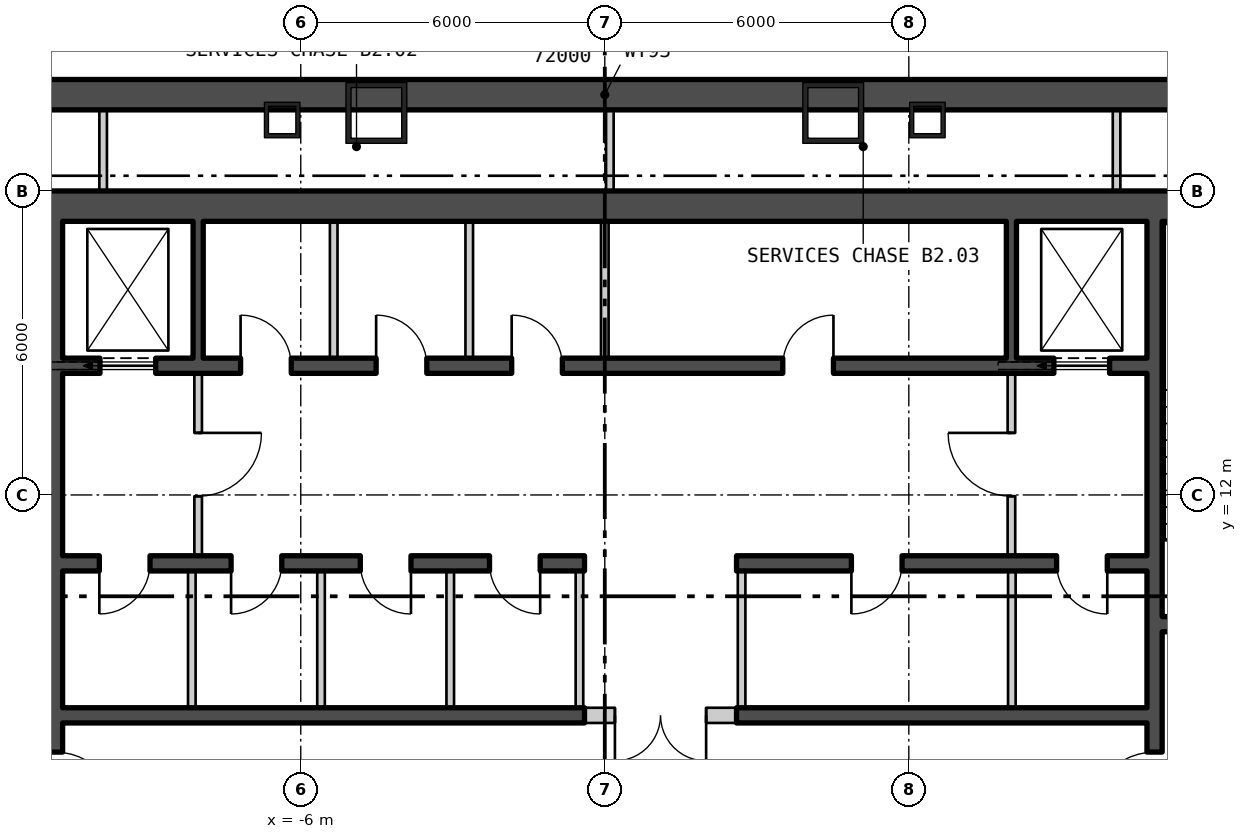
"""IFC4 building model, lengths in metres.
Left out: names, types, materials, properties, quantities, classifications, styles, units other than length and angle.
Written with IfcOpenShell. Run it as: python <this file> out.ifc"""

import sys

from ifc_helpers import new_model, si_unit, direction, frame, frame_2d, origin, origin_2d, place, context, subcontext, project, spatial, rectangle, hollow_rectangle, extrude, element, fill, save


model = new_model("IFC4")
c1 = context("Model", 3, precision=1e-05, world=origin(), true_north=direction((0.0, 1.0)))
c2 = subcontext(c1, "Body", "Model", "MODEL_VIEW")
j1 = project(units=[si_unit("LENGTHUNIT", "METRE"), si_unit("PLANEANGLEUNIT", "RADIAN")], contexts=[c1])
p1 = place(None, origin())
s1 = spatial("IfcSite", under=j1, at=p1, CompositionType="ELEMENT")
p2 = place(p1, origin())
s2 = spatial("IfcBuilding", under=s1, at=p2, CompositionType="ELEMENT")
p3 = place(p2, frame((0.0, 0.0, -11.4)))
s3 = spatial("IfcBuildingStorey", under=s2, at=p3, CompositionType="ELEMENT", Elevation=-11.4)
for number, where, z_axis, x_axis in (
    (1, (4.508, 19.54, 0.0), (0.0, 0.0, 1.0), (-1.0, 0.0, 0.0)),
    (2, (-4.508, 19.54, 0.0), (0.0, 0.0, 1.0), (-1.0, 0.0, 0.0)),
):
    element("IfcColumn", number, at=place(p3, frame(where, z_axis=z_axis, x_axis=x_axis)), inside=s3, PredefinedType="COLUMN", context=c2, shape_type="SweptSolid", body=[
        extrude(hollow_rectangle(XDim=1.2, YDim=1.2, WallThickness=0.1, at=origin_2d()), origin(), (0.0, 0.0, 1.0), 5.7),
    ])
for number, where, z_axis, x_axis in (
    (3, (6.367, 19.4, 0.0), (0.0, 0.0, 1.0), (-1.0, 0.0, 0.0)),
    (4, (-6.367, 19.4, 0.0), (0.0, 0.0, 1.0), (-1.0, 0.0, 0.0)),
):
    element("IfcColumn", number, at=place(p3, frame(where, z_axis=z_axis, x_axis=x_axis)), inside=s3, PredefinedType="COLUMN", context=c2, shape_type="SweptSolid", body=[
        extrude(hollow_rectangle(XDim=0.7, YDim=0.7, WallThickness=0.08, at=origin_2d()), origin(), (0.0, 0.0, 1.0), 5.7),
    ])
p4 = place(p3, frame((-39.0, 19.9, -0.4), z_axis=(0.0, 0.0, 1.0), x_axis=(1.0, 0.0, 0.0)))
e5 = element("IfcWall", 5, at=p4, inside=s3, PredefinedType="STANDARD", context=c2, shape_type="SweptSolid", body=[
    extrude(rectangle(XDim=78.0, YDim=0.6, at=frame_2d((39.0, 0.0))), origin(), (0.0, 0.0, 1.0), 5.7),
])
p5 = place(p3, frame((-17.5, 17.7, 0.0), z_axis=(0.0, 0.0, 1.0), x_axis=(1.0, 0.0, 0.0)))
e6 = element("IfcWall", 6, at=p5, inside=s3, PredefinedType="SHEAR", context=c2, shape_type="SweptSolid", body=[
    extrude(rectangle(XDim=35.0, YDim=0.6, at=frame_2d((17.5, 0.0))), origin(), (0.0, 0.0, 1.0), 5.25),
])
p6 = place(p3, frame((-10.85, 0.6, 0.0), z_axis=(0.0, 0.0, 1.0), x_axis=(0.0, 1.0, 0.0)))
e7 = element("IfcWall", 7, at=p6, inside=s3, PredefinedType="SHEAR", context=c2, shape_type="SweptSolid", body=[
    extrude(rectangle(XDim=16.8, YDim=0.3, at=frame_2d((8.4, 0.0))), origin(), (0.0, 0.0, 1.0), 5.25),
])
p7 = place(p6, frame((5.075, 0.0, 0.0)))
e8 = element("IfcOpeningElement", 8, at=p7, cuts=e7, PredefinedType="OPENING", context=c2, shape_type="SweptSolid", body=[
    extrude(rectangle(XDim=1.25, YDim=2.1, at=frame_2d((0.625, 1.05))), frame((0.0, 0.16, 0.0), z_axis=(0.0, -1.0, 0.0), x_axis=(1.0, 0.0, 0.0)), (0.0, 0.0, 1.0), 0.32),
])
p8 = place(p6, frame((1.525, 0.0, 0.0)))
e9 = element("IfcOpeningElement", 9, at=p8, cuts=e7, PredefinedType="OPENING", context=c2, shape_type="SweptSolid", body=[
    extrude(rectangle(XDim=1.0, YDim=2.1, at=frame_2d((0.5, 1.05))), frame((0.0, 0.16, 0.0), z_axis=(0.0, -1.0, 0.0), x_axis=(1.0, 0.0, 0.0)), (0.0, 0.0, 1.0), 0.32),
])
p9 = place(p3, frame((10.85, 0.6, 0.0), z_axis=(0.0, 0.0, 1.0), x_axis=(0.0, 1.0, 0.0)))
e10 = element("IfcWall", 10, at=p9, inside=s3, PredefinedType="SHEAR", context=c2, shape_type="SweptSolid", body=[
    extrude(rectangle(XDim=16.8, YDim=0.3, at=frame_2d((8.4, 0.0))), origin(), (0.0, 0.0, 1.0), 5.25),
])
p10 = place(p9, frame((5.075, 0.0, 0.0)))
e11 = element("IfcOpeningElement", 11, at=p10, cuts=e10, PredefinedType="OPENING", context=c2, shape_type="SweptSolid", body=[
    extrude(rectangle(XDim=1.25, YDim=2.1, at=frame_2d((0.625, 1.05))), frame((0.0, 0.16, 0.0), z_axis=(0.0, -1.0, 0.0), x_axis=(1.0, 0.0, 0.0)), (0.0, 0.0, 1.0), 0.32),
])
p11 = place(p9, frame((1.525, 0.0, 0.0)))
e12 = element("IfcOpeningElement", 12, at=p11, cuts=e10, PredefinedType="OPENING", context=c2, shape_type="SweptSolid", body=[
    extrude(rectangle(XDim=1.0, YDim=2.1, at=frame_2d((0.5, 1.05))), frame((0.0, 0.16, 0.0), z_axis=(0.0, -1.0, 0.0), x_axis=(1.0, 0.0, 0.0)), (0.0, 0.0, 1.0), 0.32),
])
p12 = place(p3, frame((11.0, 9.45, 0.0), z_axis=(0.0, 0.0, 1.0), x_axis=(1.0, 0.0, 0.0)))
e13 = element("IfcWall", 13, at=p12, inside=s3, PredefinedType="SHEAR", context=c2, shape_type="SweptSolid", body=[
    extrude(rectangle(XDim=3.2, YDim=0.3, at=frame_2d((1.6, 0.0))), origin(), (0.0, 0.0, 1.0), 5.25),
])
p13 = place(p12, frame((1.0, 0.0, 0.0)))
e14 = element("IfcOpeningElement", 14, at=p13, cuts=e13, PredefinedType="OPENING", context=c2, shape_type="SweptSolid", body=[
    extrude(rectangle(XDim=1.2, YDim=2.1, at=frame_2d((0.6, 1.05))), frame((0.0, 0.16, 0.0), z_axis=(0.0, -1.0, 0.0), x_axis=(1.0, 0.0, 0.0)), (0.0, 0.0, 1.0), 0.32),
])
p14 = place(p3, frame((-10.7, 14.55, 0.0), z_axis=(0.0, 0.0, 1.0), x_axis=(1.0, 0.0, 0.0)))
e15 = element("IfcWall", 15, at=p14, inside=s3, PredefinedType="SHEAR", context=c2, shape_type="SweptSolid", body=[
    extrude(rectangle(XDim=21.4, YDim=0.3, at=frame_2d((10.7, 0.0))), origin(), (0.0, 0.0, 1.0), 5.25),
])
p15 = place(p14, frame((0.738, 0.0, 0.0)))
e16 = element("IfcOpeningElement", 16, at=p15, cuts=e15, PredefinedType="OPENING", context=c2, shape_type="SweptSolid", body=[
    extrude(rectangle(XDim=1.1, YDim=2.1, at=frame_2d((0.55, 1.05))), frame((0.0, 0.16, 0.0), z_axis=(0.0, -1.0, 0.0), x_axis=(1.0, 0.0, 0.0)), (0.0, 0.0, 1.0), 0.32),
])
p16 = place(p14, frame((19.562, 0.0, 0.0)))
e17 = element("IfcOpeningElement", 17, at=p16, cuts=e15, PredefinedType="OPENING", context=c2, shape_type="SweptSolid", body=[
    extrude(rectangle(XDim=1.1, YDim=2.1, at=frame_2d((0.55, 1.05))), frame((0.0, 0.16, 0.0), z_axis=(0.0, -1.0, 0.0), x_axis=(1.0, 0.0, 0.0)), (0.0, 0.0, 1.0), 0.32),
])
p17 = place(p14, frame((3.513, 0.0, 0.0)))
e18 = element("IfcOpeningElement", 18, at=p17, cuts=e15, PredefinedType="OPENING", context=c2, shape_type="SweptSolid", body=[
    extrude(rectangle(XDim=1.0, YDim=2.1, at=frame_2d((0.5, 1.05))), frame((0.0, 0.16, 0.0), z_axis=(0.0, -1.0, 0.0), x_axis=(1.0, 0.0, 0.0)), (0.0, 0.0, 1.0), 0.32),
])
p18 = place(p14, frame((6.188, 0.0, 0.0)))
e19 = element("IfcOpeningElement", 19, at=p18, cuts=e15, PredefinedType="OPENING", context=c2, shape_type="SweptSolid", body=[
    extrude(rectangle(XDim=1.0, YDim=2.1, at=frame_2d((0.5, 1.05))), frame((0.0, 0.16, 0.0), z_axis=(0.0, -1.0, 0.0), x_axis=(1.0, 0.0, 0.0)), (0.0, 0.0, 1.0), 0.32),
])
p19 = place(p14, frame((8.863, 0.0, 0.0)))
e20 = element("IfcOpeningElement", 20, at=p19, cuts=e15, PredefinedType="OPENING", context=c2, shape_type="SweptSolid", body=[
    extrude(rectangle(XDim=1.0, YDim=2.1, at=frame_2d((0.5, 1.05))), frame((0.0, 0.16, 0.0), z_axis=(0.0, -1.0, 0.0), x_axis=(1.0, 0.0, 0.0)), (0.0, 0.0, 1.0), 0.32),
])
p20 = place(p14, frame((14.213, 0.0, 0.0)))
e21 = element("IfcOpeningElement", 21, at=p20, cuts=e15, PredefinedType="OPENING", context=c2, shape_type="SweptSolid", body=[
    extrude(rectangle(XDim=1.0, YDim=2.1, at=frame_2d((0.5, 1.05))), frame((0.0, 0.16, 0.0), z_axis=(0.0, -1.0, 0.0), x_axis=(1.0, 0.0, 0.0)), (0.0, 0.0, 1.0), 0.32),
])
p21 = place(p3, frame((-10.7, 10.65, 0.0), z_axis=(0.0, 0.0, 1.0), x_axis=(1.0, 0.0, 0.0)))
e22 = element("IfcWall", 22, at=p21, inside=s3, PredefinedType="SHEAR", context=c2, shape_type="SweptSolid", body=[
    extrude(rectangle(XDim=10.3, YDim=0.3, at=frame_2d((5.15, 0.0))), origin(), (0.0, 0.0, 1.0), 5.25),
])
p22 = place(p21, frame((0.725, 0.0, 0.0)))
e23 = element("IfcOpeningElement", 23, at=p22, cuts=e22, PredefinedType="OPENING", context=c2, shape_type="SweptSolid", body=[
    extrude(rectangle(XDim=1.0, YDim=2.1, at=frame_2d((0.5, 1.05))), frame((0.0, 0.16, 0.0), z_axis=(0.0, -1.0, 0.0), x_axis=(1.0, 0.0, 0.0)), (0.0, 0.0, 1.0), 0.32),
])
p23 = place(p21, frame((3.325, 0.0, 0.0)))
e24 = element("IfcOpeningElement", 24, at=p23, cuts=e22, PredefinedType="OPENING", context=c2, shape_type="SweptSolid", body=[
    extrude(rectangle(XDim=1.0, YDim=2.1, at=frame_2d((0.5, 1.05))), frame((0.0, 0.16, 0.0), z_axis=(0.0, -1.0, 0.0), x_axis=(1.0, 0.0, 0.0)), (0.0, 0.0, 1.0), 0.32),
])
p24 = place(p21, frame((5.875, 0.0, 0.0)))
e25 = element("IfcOpeningElement", 25, at=p24, cuts=e22, PredefinedType="OPENING", context=c2, shape_type="SweptSolid", body=[
    extrude(rectangle(XDim=1.0, YDim=2.1, at=frame_2d((0.5, 1.05))), frame((0.0, 0.16, 0.0), z_axis=(0.0, -1.0, 0.0), x_axis=(1.0, 0.0, 0.0)), (0.0, 0.0, 1.0), 0.32),
])
p25 = place(p21, frame((8.425, 0.0, 0.0)))
e26 = element("IfcOpeningElement", 26, at=p25, cuts=e22, PredefinedType="OPENING", context=c2, shape_type="SweptSolid", body=[
    extrude(rectangle(XDim=1.0, YDim=2.1, at=frame_2d((0.5, 1.05))), frame((0.0, 0.16, 0.0), z_axis=(0.0, -1.0, 0.0), x_axis=(1.0, 0.0, 0.0)), (0.0, 0.0, 1.0), 0.32),
])
p26 = place(p3, frame((-10.7, 7.65, 0.0), z_axis=(0.0, 0.0, 1.0), x_axis=(1.0, 0.0, 0.0)))
e27 = element("IfcWall", 27, at=p26, inside=s3, PredefinedType="SHEAR", context=c2, shape_type="SweptSolid", body=[
    extrude(rectangle(XDim=10.3, YDim=0.3, at=frame_2d((5.15, 0.0))), origin(), (0.0, 0.0, 1.0), 5.25),
])
p27 = place(p3, frame((2.6, 10.65, 0.0), z_axis=(0.0, 0.0, 1.0), x_axis=(1.0, 0.0, 0.0)))
e28 = element("IfcWall", 28, at=p27, inside=s3, PredefinedType="SHEAR", context=c2, shape_type="SweptSolid", body=[
    extrude(rectangle(XDim=8.1, YDim=0.3, at=frame_2d((4.05, 0.0))), origin(), (0.0, 0.0, 1.0), 5.25),
])
p28 = place(p27, frame((2.267, 0.0, 0.0)))
e29 = element("IfcOpeningElement", 29, at=p28, cuts=e28, PredefinedType="OPENING", context=c2, shape_type="SweptSolid", body=[
    extrude(rectangle(XDim=1.0, YDim=2.1, at=frame_2d((0.5, 1.05))), frame((0.0, 0.16, 0.0), z_axis=(0.0, -1.0, 0.0), x_axis=(1.0, 0.0, 0.0)), (0.0, 0.0, 1.0), 0.32),
])
p29 = place(p27, frame((6.317, 0.0, 0.0)))
e30 = element("IfcOpeningElement", 30, at=p29, cuts=e28, PredefinedType="OPENING", context=c2, shape_type="SweptSolid", body=[
    extrude(rectangle(XDim=1.0, YDim=2.1, at=frame_2d((0.5, 1.05))), frame((0.0, 0.16, 0.0), z_axis=(0.0, -1.0, 0.0), x_axis=(1.0, 0.0, 0.0)), (0.0, 0.0, 1.0), 0.32),
])
p30 = place(p3, frame((2.6, 7.65, 0.0), z_axis=(0.0, 0.0, 1.0), x_axis=(1.0, 0.0, 0.0)))
e31 = element("IfcWall", 31, at=p30, inside=s3, PredefinedType="SHEAR", context=c2, shape_type="SweptSolid", body=[
    extrude(rectangle(XDim=8.1, YDim=0.3, at=frame_2d((4.05, 0.0))), origin(), (0.0, 0.0, 1.0), 5.25),
])
p31 = place(p3, frame((-8.025, 14.7, 0.0), z_axis=(0.0, 0.0, 1.0), x_axis=(0.0, 1.0, 0.0)))
e32 = element("IfcWall", 32, at=p31, inside=s3, PredefinedType="SHEAR", context=c2, shape_type="SweptSolid", body=[
    extrude(rectangle(XDim=2.7, YDim=0.2, at=frame_2d((1.35, 0.0))), origin(), (0.0, 0.0, 1.0), 5.25),
])
for number, where, z_axis, x_axis in (
    (33, (-5.35, 14.7, 0.0), (0.0, 0.0, 1.0), (0.0, 1.0, 0.0)),
    (34, (-2.675, 14.7, 0.0), (0.0, 0.0, 1.0), (0.0, 1.0, 0.0)),
    (35, (0.0, 14.7, 0.0), (0.0, 0.0, 1.0), (0.0, 1.0, 0.0)),
):
    element("IfcWall", number, at=place(p3, frame(where, z_axis=z_axis, x_axis=x_axis)), inside=s3, PredefinedType="PARTITIONING", context=c2, shape_type="SweptSolid", body=[
        extrude(rectangle(XDim=2.7, YDim=0.15, at=frame_2d((1.35, 0.0))), origin(), (0.0, 0.0, 1.0), 5.25),
    ])
p32 = place(p3, frame((8.025, 14.7, 0.0), z_axis=(0.0, 0.0, 1.0), x_axis=(0.0, 1.0, 0.0)))
e36 = element("IfcWall", 36, at=p32, inside=s3, PredefinedType="SHEAR", context=c2, shape_type="SweptSolid", body=[
    extrude(rectangle(XDim=2.7, YDim=0.2, at=frame_2d((1.35, 0.0))), origin(), (0.0, 0.0, 1.0), 5.25),
])
for number, where, z_axis, x_axis in (
    (37, (-8.15, 7.8, 0.0), (0.0, 0.0, 1.0), (0.0, 1.0, 0.0)),
    (38, (-5.6, 7.8, 0.0), (0.0, 0.0, 1.0), (0.0, 1.0, 0.0)),
    (39, (-3.05, 7.8, 0.0), (0.0, 0.0, 1.0), (0.0, 1.0, 0.0)),
    (40, (-0.5, 7.8, 0.0), (0.0, 0.0, 1.0), (0.0, 1.0, 0.0)),
    (41, (2.7, 7.8, 0.0), (0.0, 0.0, 1.0), (0.0, 1.0, 0.0)),
    (42, (8.033, 7.8, 0.0), (0.0, 0.0, 1.0), (0.0, 1.0, 0.0)),
):
    element("IfcWall", number, at=place(p3, frame(where, z_axis=z_axis, x_axis=x_axis)), inside=s3, PredefinedType="PARTITIONING", context=c2, shape_type="SweptSolid", body=[
        extrude(rectangle(XDim=2.7, YDim=0.15, at=frame_2d((1.35, 0.0))), origin(), (0.0, 0.0, 1.0), 5.25),
    ])
p33 = place(p3, frame((-8.025, 10.8, 0.0), z_axis=(0.0, 0.0, 1.0), x_axis=(0.0, 1.0, 0.0)))
e43 = element("IfcWall", 43, at=p33, inside=s3, PredefinedType="PARTITIONING", context=c2, shape_type="SweptSolid", body=[
    extrude(rectangle(XDim=3.6, YDim=0.15, at=frame_2d((1.8, 0.0))), origin(), (0.0, 0.0, 1.0), 5.25),
])
p34 = place(p33, frame((1.175, 0.0, 0.0)))
e44 = element("IfcOpeningElement", 44, at=p34, cuts=e43, PredefinedType="OPENING", context=c2, shape_type="SweptSolid", body=[
    extrude(rectangle(XDim=1.25, YDim=2.1, at=frame_2d((0.625, 1.05))), frame((0.0, 0.085, 0.0), z_axis=(0.0, -1.0, 0.0), x_axis=(1.0, 0.0, 0.0)), (0.0, 0.0, 1.0), 0.17),
])
p35 = place(p3, frame((8.025, 10.8, 0.0), z_axis=(0.0, 0.0, 1.0), x_axis=(0.0, 1.0, 0.0)))
e45 = element("IfcWall", 45, at=p35, inside=s3, PredefinedType="PARTITIONING", context=c2, shape_type="SweptSolid", body=[
    extrude(rectangle(XDim=3.6, YDim=0.15, at=frame_2d((1.8, 0.0))), origin(), (0.0, 0.0, 1.0), 5.25),
])
p36 = place(p35, frame((1.175, 0.0, 0.0)))
e46 = element("IfcOpeningElement", 46, at=p36, cuts=e45, PredefinedType="OPENING", context=c2, shape_type="SweptSolid", body=[
    extrude(rectangle(XDim=1.25, YDim=2.1, at=frame_2d((0.625, 1.05))), frame((0.0, 0.085, 0.0), z_axis=(0.0, -1.0, 0.0), x_axis=(1.0, 0.0, 0.0)), (0.0, 0.0, 1.0), 0.17),
])
p37 = place(p3, frame((-0.4, 7.65, 0.0), z_axis=(0.0, 0.0, 1.0), x_axis=(1.0, 0.0, 0.0)))
e47 = element("IfcWall", 47, at=p37, inside=s3, PredefinedType="PARTITIONING", context=c2, shape_type="SweptSolid", body=[
    extrude(rectangle(XDim=3.0, YDim=0.3, at=frame_2d((1.5, 0.0))), origin(), (0.0, 0.0, 1.0), 5.25),
])
p38 = place(p37, frame((0.6, 0.0, 0.0)))
e48 = element("IfcOpeningElement", 48, at=p38, cuts=e47, PredefinedType="OPENING", context=c2, shape_type="SweptSolid", body=[
    extrude(rectangle(XDim=1.8, YDim=2.4, at=frame_2d((0.9, 1.2))), frame((0.0, 0.16, 0.0), z_axis=(0.0, -1.0, 0.0), x_axis=(1.0, 0.0, 0.0)), (0.0, 0.0, 1.0), 0.32),
])
for number, where, z_axis, x_axis in (
    (49, (-9.9, 18.0, 0.0), (0.0, 0.0, 1.0), (0.0, 1.0, 0.0)),
    (50, (0.1, 18.0, 0.0), (0.0, 0.0, 1.0), (0.0, 1.0, 0.0)),
    (51, (10.1, 18.0, 0.0), (0.0, 0.0, 1.0), (0.0, 1.0, 0.0)),
):
    element("IfcWall", number, at=place(p3, frame(where, z_axis=z_axis, x_axis=x_axis)), inside=s3, PredefinedType="PARTITIONING", context=c2, shape_type="SweptSolid", body=[
        extrude(rectangle(XDim=1.75, YDim=0.15, at=frame_2d((0.875, 0.0))), origin(), (0.0, 0.0, 1.0), 5.25),
    ])
p39 = place(p15, origin())
e52 = element("IfcDoor", 52, at=p39, inside=s3, OperationType="SLIDING_TO_LEFT", PredefinedType="DOOR", context=c2, shape_type="SweptSolid", body=[
    extrude(rectangle(XDim=1.1, YDim=2.1, at=frame_2d((0.55, 1.05))), frame((0.0, 0.025, 0.0), z_axis=(0.0, -1.0, 0.0), x_axis=(1.0, 0.0, 0.0)), (0.0, 0.0, 1.0), 0.05),
])
fill(e16, e52)
p40 = place(p16, origin())
e53 = element("IfcDoor", 53, at=p40, inside=s3, OperationType="SLIDING_TO_LEFT", PredefinedType="DOOR", context=c2, shape_type="SweptSolid", body=[
    extrude(rectangle(XDim=1.1, YDim=2.1, at=frame_2d((0.55, 1.05))), frame((0.0, 0.025, 0.0), z_axis=(0.0, -1.0, 0.0), x_axis=(1.0, 0.0, 0.0)), (0.0, 0.0, 1.0), 0.05),
])
fill(e17, e53)
p41 = place(p17, origin())
e54 = element("IfcDoor", 54, at=p41, inside=s3, OperationType="SINGLE_SWING_RIGHT", PredefinedType="DOOR", context=c2, shape_type="SweptSolid", body=[
    extrude(rectangle(XDim=1.0, YDim=2.1, at=frame_2d((0.5, 1.05))), frame((0.0, 0.025, 0.0), z_axis=(0.0, -1.0, 0.0), x_axis=(1.0, 0.0, 0.0)), (0.0, 0.0, 1.0), 0.05),
])
fill(e18, e54)
p42 = place(p18, origin())
e55 = element("IfcDoor", 55, at=p42, inside=s3, OperationType="SINGLE_SWING_RIGHT", PredefinedType="DOOR", context=c2, shape_type="SweptSolid", body=[
    extrude(rectangle(XDim=1.0, YDim=2.1, at=frame_2d((0.5, 1.05))), frame((0.0, 0.025, 0.0), z_axis=(0.0, -1.0, 0.0), x_axis=(1.0, 0.0, 0.0)), (0.0, 0.0, 1.0), 0.05),
])
fill(e19, e55)
p43 = place(p19, origin())
e56 = element("IfcDoor", 56, at=p43, inside=s3, OperationType="SINGLE_SWING_RIGHT", PredefinedType="DOOR", context=c2, shape_type="SweptSolid", body=[
    extrude(rectangle(XDim=1.0, YDim=2.1, at=frame_2d((0.5, 1.05))), frame((0.0, 0.025, 0.0), z_axis=(0.0, -1.0, 0.0), x_axis=(1.0, 0.0, 0.0)), (0.0, 0.0, 1.0), 0.05),
])
fill(e20, e56)
p44 = place(p20, origin())
e57 = element("IfcDoor", 57, at=p44, inside=s3, OperationType="SINGLE_SWING_LEFT", PredefinedType="DOOR", context=c2, shape_type="SweptSolid", body=[
    extrude(rectangle(XDim=1.0, YDim=2.1, at=frame_2d((0.5, 1.05))), frame((0.0, 0.025, 0.0), z_axis=(0.0, -1.0, 0.0), x_axis=(1.0, 0.0, 0.0)), (0.0, 0.0, 1.0), 0.05),
])
fill(e21, e57)
p45 = place(p22, origin())
e58 = element("IfcDoor", 58, at=p45, inside=s3, OperationType="SINGLE_SWING_LEFT", PredefinedType="DOOR", context=c2, shape_type="SweptSolid", body=[
    extrude(rectangle(XDim=1.0, YDim=2.1, at=frame_2d((0.5, 1.05))), frame((0.0, 0.025, 0.0), z_axis=(0.0, -1.0, 0.0), x_axis=(1.0, 0.0, 0.0)), (0.0, 0.0, 1.0), 0.05),
])
fill(e23, e58)
p46 = place(p23, origin())
e59 = element("IfcDoor", 59, at=p46, inside=s3, OperationType="SINGLE_SWING_LEFT", PredefinedType="DOOR", context=c2, shape_type="SweptSolid", body=[
    extrude(rectangle(XDim=1.0, YDim=2.1, at=frame_2d((0.5, 1.05))), frame((0.0, 0.025, 0.0), z_axis=(0.0, -1.0, 0.0), x_axis=(1.0, 0.0, 0.0)), (0.0, 0.0, 1.0), 0.05),
])
fill(e24, e59)
p47 = place(p24, origin())
e60 = element("IfcDoor", 60, at=p47, inside=s3, OperationType="SINGLE_SWING_RIGHT", PredefinedType="DOOR", context=c2, shape_type="SweptSolid", body=[
    extrude(rectangle(XDim=1.0, YDim=2.1, at=frame_2d((0.5, 1.05))), frame((0.0, 0.025, 0.0), z_axis=(0.0, -1.0, 0.0), x_axis=(1.0, 0.0, 0.0)), (0.0, 0.0, 1.0), 0.05),
])
fill(e25, e60)
p48 = place(p25, origin())
e61 = element("IfcDoor", 61, at=p48, inside=s3, OperationType="SINGLE_SWING_RIGHT", PredefinedType="DOOR", context=c2, shape_type="SweptSolid", body=[
    extrude(rectangle(XDim=1.0, YDim=2.1, at=frame_2d((0.5, 1.05))), frame((0.0, 0.025, 0.0), z_axis=(0.0, -1.0, 0.0), x_axis=(1.0, 0.0, 0.0)), (0.0, 0.0, 1.0), 0.05),
])
fill(e26, e61)
p49 = place(p28, origin())
e62 = element("IfcDoor", 62, at=p49, inside=s3, OperationType="SINGLE_SWING_LEFT", PredefinedType="DOOR", context=c2, shape_type="SweptSolid", body=[
    extrude(rectangle(XDim=1.0, YDim=2.1, at=frame_2d((0.5, 1.05))), frame((0.0, 0.025, 0.0), z_axis=(0.0, -1.0, 0.0), x_axis=(1.0, 0.0, 0.0)), (0.0, 0.0, 1.0), 0.05),
])
fill(e29, e62)
p50 = place(p29, origin())
e63 = element("IfcDoor", 63, at=p50, inside=s3, OperationType="SINGLE_SWING_RIGHT", PredefinedType="DOOR", context=c2, shape_type="SweptSolid", body=[
    extrude(rectangle(XDim=1.0, YDim=2.1, at=frame_2d((0.5, 1.05))), frame((0.0, 0.025, 0.0), z_axis=(0.0, -1.0, 0.0), x_axis=(1.0, 0.0, 0.0)), (0.0, 0.0, 1.0), 0.05),
])
fill(e30, e63)
p51 = place(p34, origin())
e64 = element("IfcDoor", 64, at=p51, inside=s3, OperationType="SINGLE_SWING_RIGHT", PredefinedType="DOOR", context=c2, shape_type="SweptSolid", body=[
    extrude(rectangle(XDim=1.25, YDim=2.1, at=frame_2d((0.625, 1.05))), frame((0.0, 0.025, 0.0), z_axis=(0.0, -1.0, 0.0), x_axis=(1.0, 0.0, 0.0)), (0.0, 0.0, 1.0), 0.05),
])
fill(e44, e64)
p52 = place(p7, origin())
e65 = element("IfcDoor", 65, at=p52, inside=s3, OperationType="SINGLE_SWING_LEFT", PredefinedType="DOOR", context=c2, shape_type="SweptSolid", body=[
    extrude(rectangle(XDim=1.25, YDim=2.1, at=frame_2d((0.625, 1.05))), frame((0.0, 0.025, 0.0), z_axis=(0.0, -1.0, 0.0), x_axis=(1.0, 0.0, 0.0)), (0.0, 0.0, 1.0), 0.05),
])
fill(e8, e65)
p53 = place(p36, origin())
e66 = element("IfcDoor", 66, at=p53, inside=s3, OperationType="SINGLE_SWING_LEFT", PredefinedType="DOOR", context=c2, shape_type="SweptSolid", body=[
    extrude(rectangle(XDim=1.25, YDim=2.1, at=frame_2d((0.625, 1.05))), frame((0.0, 0.025, 0.0), z_axis=(0.0, -1.0, 0.0), x_axis=(1.0, 0.0, 0.0)), (0.0, 0.0, 1.0), 0.05),
])
fill(e46, e66)
p54 = place(p10, origin())
e67 = element("IfcDoor", 67, at=p54, inside=s3, OperationType="SINGLE_SWING_RIGHT", PredefinedType="DOOR", context=c2, shape_type="SweptSolid", body=[
    extrude(rectangle(XDim=1.25, YDim=2.1, at=frame_2d((0.625, 1.05))), frame((0.0, 0.025, 0.0), z_axis=(0.0, -1.0, 0.0), x_axis=(1.0, 0.0, 0.0)), (0.0, 0.0, 1.0), 0.05),
])
fill(e11, e67)
p55 = place(p38, origin())
e68 = element("IfcDoor", 68, at=p55, inside=s3, OperationType="DOUBLE_DOOR_SINGLE_SWING", PredefinedType="DOOR", context=c2, shape_type="SweptSolid", body=[
    extrude(rectangle(XDim=1.8, YDim=2.4, at=frame_2d((0.9, 1.2))), frame((0.0, 0.025, 0.0), z_axis=(0.0, -1.0, 0.0), x_axis=(1.0, 0.0, 0.0)), (0.0, 0.0, 1.0), 0.05),
])
fill(e48, e68)
save(model, sys.argv[1])
